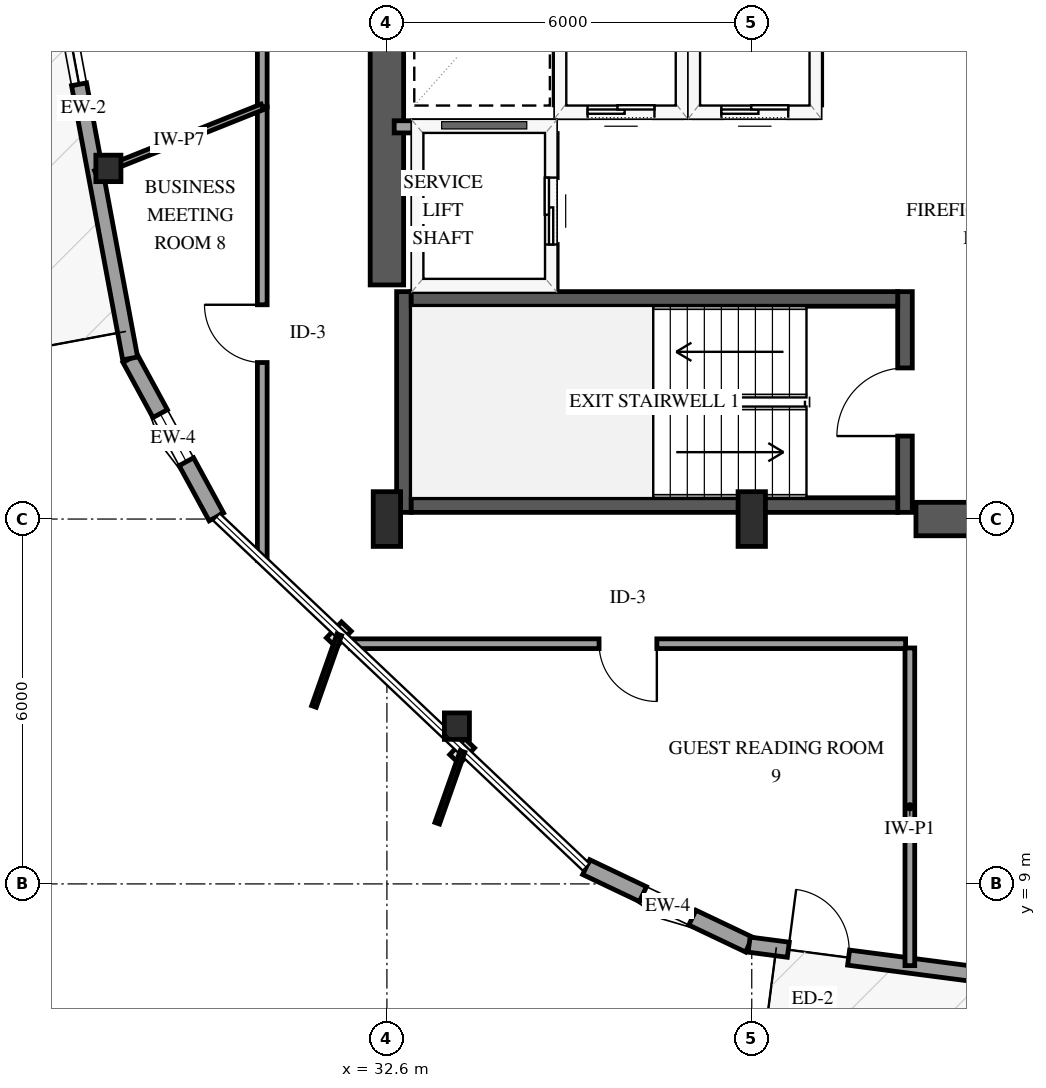
"""IFC4 building model, lengths in metres.
Left out: names, types, materials, properties, quantities, classifications, styles, units other than length and angle.
Written with IfcOpenShell. Run it as: python <this file> out.ifc"""

import sys

from ifc_helpers import new_model, si_unit, direction, frame, frame_2d, origin, origin_2d, place, context, subcontext, project, spatial, rectangle, i_section, extrude, element, fill, save


model = new_model("IFC4")
c1 = context("Model", 3, precision=1e-05, world=origin(), true_north=direction((0.0, 1.0)))
c2 = subcontext(c1, "Body", "Model", "MODEL_VIEW")
j1 = project(units=[si_unit("LENGTHUNIT", "METRE"), si_unit("PLANEANGLEUNIT", "RADIAN")], contexts=[c1])
p1 = place(None, origin())
s1 = spatial("IfcSite", under=j1, at=p1, CompositionType="ELEMENT")
p2 = place(p1, origin())
s2 = spatial("IfcBuilding", under=s1, at=p2, CompositionType="ELEMENT")
p3 = place(p2, frame((0.0, 0.0, 139.0)))
s3 = spatial("IfcBuildingStorey", under=s2, at=p3, CompositionType="ELEMENT", Elevation=139.0)
p4 = place(p3, frame((32.88, 15.11, 0.0), z_axis=(0.0, 0.0, 1.0), x_axis=(0.0, 1.0, 0.0)))
e1 = element("IfcWall", 1, at=p4, inside=s3, PredefinedType="SHEAR", context=c2, shape_type="SweptSolid", body=[
    extrude(rectangle(XDim=3.63, YDim=0.24, at=frame_2d((1.815, 0.0))), origin(), (0.0, 0.0, 1.0), 3.6),
])
p5 = place(p3, frame((41.12, 15.11, 0.0), z_axis=(0.0, 0.0, 1.0), x_axis=(0.0, 1.0, 0.0)))
e2 = element("IfcWall", 2, at=p5, inside=s3, PredefinedType="SHEAR", context=c2, shape_type="SweptSolid", body=[
    extrude(rectangle(XDim=3.63, YDim=0.24, at=frame_2d((1.815, 0.0))), origin(), (0.0, 0.0, 1.0), 3.6),
])
p6 = place(p5, frame((1.255, 0.0, 0.0)))
e3 = element("IfcOpeningElement", 3, at=p6, cuts=e2, PredefinedType="OPENING", context=c2, shape_type="SweptSolid", body=[
    extrude(rectangle(XDim=1.12, YDim=2.15, at=frame_2d((0.56, 1.075))), frame((0.0, 0.13, 0.0), z_axis=(0.0, -1.0, 0.0), x_axis=(1.0, 0.0, 0.0)), (0.0, 0.0, 1.0), 0.26),
])
for number, where, z_axis, x_axis in (
    (4, (33.0, 15.23, 0.0), (0.0, 0.0, 1.0), (1.0, 0.0, 0.0)),
    (5, (33.0, 18.62, 0.0), (0.0, 0.0, 1.0), (1.0, 0.0, 0.0)),
):
    element("IfcWall", number, at=place(p3, frame(where, z_axis=z_axis, x_axis=x_axis)), inside=s3, PredefinedType="SHEAR", context=c2, shape_type="SweptSolid", body=[
        extrude(rectangle(XDim=8.0, YDim=0.24, at=frame_2d((4.0, 0.0))), origin(), (0.0, 0.0, 1.0), 3.6),
    ])
p7 = place(p3, frame((32.6, 18.85, 0.0), z_axis=(0.0, 0.0, 1.0), x_axis=(0.0, 1.0, 0.0)))
e6 = element("IfcWall", 6, at=p7, inside=s3, PredefinedType="SHEAR", context=c2, shape_type="SweptSolid", body=[
    extrude(rectangle(XDim=12.3, YDim=0.55, at=frame_2d((6.15, 0.0))), origin(), (0.0, 0.0, 1.0), 3.6),
])
p8 = place(p3, frame((41.3, 15.0, 0.0), z_axis=(0.0, 0.0, 1.0), x_axis=(1.0, 0.0, 0.0)))
e7 = element("IfcWall", 7, at=p8, inside=s3, PredefinedType="SHEAR", context=c2, shape_type="SweptSolid", body=[
    extrude(rectangle(XDim=2.85, YDim=0.55, at=frame_2d((1.425, 0.0))), origin(), (0.0, 0.0, 1.0), 3.6),
])
for number, where, z_axis, x_axis in (
    (8, (32.6, 15.0, -0.3), (0.0, 0.0, 1.0), (1.0, 0.0, 0.0)),
    (9, (38.6, 15.0, -0.3), (0.0, 0.0, 1.0), (1.0, 0.0, 0.0)),
):
    element("IfcColumn", number, at=place(p3, frame(where, z_axis=z_axis, x_axis=x_axis)), inside=s3, PredefinedType="PILASTER", context=c2, shape_type="SweptSolid", body=[
        extrude(rectangle(XDim=0.45, YDim=0.9, at=origin_2d()), origin(), (0.0, 0.0, 1.0), 3.9),
    ])
for number, where, z_axis, x_axis in (
    (10, (28.02, 20.766, -0.3), (0.0, 0.0, 1.0), (1.0, 0.0, 0.0)),
    (11, (33.751, 11.594, -0.3), (0.0, 0.0, 1.0), (1.0, 0.0, 0.0)),
):
    element("IfcColumn", number, at=place(p3, frame(where, z_axis=z_axis, x_axis=x_axis)), inside=s3, PredefinedType="COLUMN", context=c2, shape_type="SweptSolid", body=[
        extrude(i_section(OverallWidth=0.412, OverallDepth=0.435, WebThickness=0.036, FlangeThickness=0.057, FilletRadius=0.038, at=origin_2d()), origin(), (0.0, 0.0, 1.0), 3.9),
    ])
p9 = place(p3, frame((28.377, 17.641, 0.0), z_axis=(0.0, 0.0, 1.0), x_axis=(0.478085030824, -0.878313556369, 0.0)))
e12 = element("IfcWall", 12, at=p9, inside=s3, PredefinedType="SOLIDWALL", context=c2, shape_type="SweptSolid", body=[
    extrude(rectangle(XDim=2.967, YDim=0.27, at=frame_2d((1.483, 0.0))), origin(), (0.0, 0.0, 1.0), 2.679),
])
p10 = place(p9, frame((1.033, 0.0, 0.75)))
e13 = element("IfcOpeningElement", 13, at=p10, cuts=e12, PredefinedType="OPENING", context=c2, shape_type="SweptSolid", body=[
    extrude(rectangle(XDim=0.9, YDim=1.5, at=frame_2d((0.45, 0.75))), frame((0.0, 0.145, 0.0), z_axis=(0.0, -1.0, 0.0), x_axis=(1.0, 0.0, 0.0)), (0.0, 0.0, 1.0), 0.29),
])
p11 = place(p3, frame((26.842, 25.875, 0.0), z_axis=(0.0, 0.0, 1.0), x_axis=(0.183274789928, -0.983061723076, 0.0)))
e14 = element("IfcWall", 14, at=p11, inside=s3, PredefinedType="SOLIDWALL", context=c2, shape_type="SweptSolid", body=[
    extrude(rectangle(XDim=8.376, YDim=0.25, at=frame_2d((4.188, 0.0))), origin(), (0.0, 0.0, 1.0), 2.679),
])
p12 = place(p11, frame((0.65, 0.0, 0.0)))
e15 = element("IfcOpeningElement", 15, at=p12, cuts=e14, PredefinedType="OPENING", context=c2, shape_type="SweptSolid", body=[
    extrude(rectangle(XDim=1.0, YDim=2.15, at=frame_2d((0.5, 1.075))), frame((0.0, 0.135, 0.0), z_axis=(0.0, -1.0, 0.0), x_axis=(1.0, 0.0, 0.0)), (0.0, 0.0, 1.0), 0.27),
])
p13 = place(p11, frame((2.29, 0.0, 0.72)))
e16 = element("IfcOpeningElement", 16, at=p13, cuts=e14, PredefinedType="OPENING", context=c2, shape_type="SweptSolid", body=[
    extrude(rectangle(XDim=1.5, YDim=1.7, at=frame_2d((0.75, 0.85))), frame((0.0, 0.135, 0.0), z_axis=(0.0, -1.0, 0.0), x_axis=(1.0, 0.0, 0.0)), (0.0, 0.0, 1.0), 0.27),
])
p14 = place(p3, frame((35.878, 9.276, 0.0), z_axis=(0.0, 0.0, 1.0), x_axis=(0.903059702478, -0.429515044859, 0.0)))
e17 = element("IfcWall", 17, at=p14, inside=s3, PredefinedType="SOLIDWALL", context=c2, shape_type="SweptSolid", body=[
    extrude(rectangle(XDim=2.967, YDim=0.27, at=frame_2d((1.483, 0.0))), origin(), (0.0, 0.0, 1.0), 2.679),
])
p15 = place(p14, frame((1.033, 0.0, 0.75)))
e18 = element("IfcOpeningElement", 18, at=p15, cuts=e17, PredefinedType="OPENING", context=c2, shape_type="SweptSolid", body=[
    extrude(rectangle(XDim=0.9, YDim=1.5, at=frame_2d((0.45, 0.75))), frame((0.0, 0.145, 0.0), z_axis=(0.0, -1.0, 0.0), x_axis=(1.0, 0.0, 0.0)), (0.0, 0.0, 1.0), 0.29),
])
p16 = place(p3, frame((38.557, 8.002, 0.0), z_axis=(0.0, 0.0, 1.0), x_axis=(0.991579431853, -0.129499924037, 0.0)))
e19 = element("IfcWall", 19, at=p16, inside=s3, PredefinedType="SOLIDWALL", context=c2, shape_type="SweptSolid", body=[
    extrude(rectangle(XDim=8.376, YDim=0.25, at=frame_2d((4.188, 0.0))), origin(), (0.0, 0.0, 1.0), 2.679),
])
p17 = place(p16, frame((0.65, 0.0, 0.0)))
e20 = element("IfcOpeningElement", 20, at=p17, cuts=e19, PredefinedType="OPENING", context=c2, shape_type="SweptSolid", body=[
    extrude(rectangle(XDim=1.0, YDim=2.15, at=frame_2d((0.5, 1.075))), frame((0.0, 0.135, 0.0), z_axis=(0.0, -1.0, 0.0), x_axis=(1.0, 0.0, 0.0)), (0.0, 0.0, 1.0), 0.27),
])
p18 = place(p16, frame((5.745, 0.0, 0.72)))
e21 = element("IfcOpeningElement", 21, at=p18, cuts=e19, PredefinedType="OPENING", context=c2, shape_type="SweptSolid", body=[
    extrude(rectangle(XDim=1.5, YDim=1.7, at=frame_2d((0.75, 0.85))), frame((0.0, 0.135, 0.0), z_axis=(0.0, -1.0, 0.0), x_axis=(1.0, 0.0, 0.0)), (0.0, 0.0, 1.0), 0.27),
])
p19 = place(p3, frame((35.45, 21.7, 0.0), z_axis=(0.0, 0.0, 1.0), x_axis=(1.0, 0.0, 0.0)))
e22 = element("IfcWall", 22, at=p19, inside=s3, PredefinedType="SOLIDWALL", context=c2, shape_type="SweptSolid", body=[
    extrude(rectangle(XDim=2.0, YDim=0.2, at=frame_2d((1.0, 0.0))), origin(), (0.0, 0.0, 1.0), 3.3),
])
p20 = place(p19, frame((0.45, 0.0, 0.0)))
e23 = element("IfcOpeningElement", 23, at=p20, cuts=e22, PredefinedType="OPENING", context=c2, shape_type="SweptSolid", body=[
    extrude(rectangle(XDim=1.1, YDim=2.15, at=frame_2d((0.55, 1.075))), frame((0.0, 0.11, 0.0), z_axis=(0.0, -1.0, 0.0), x_axis=(1.0, 0.0, 0.0)), (0.0, 0.0, 1.0), 0.22),
])
for number, where, z_axis, x_axis in (
    (24, (35.45, 21.81, 0.0), (0.0, 0.0, 1.0), (0.0, 1.0, 0.0)),
    (25, (37.45, 21.81, 0.0), (0.0, 0.0, 1.0), (0.0, 1.0, 0.0)),
):
    element("IfcWall", number, at=place(p3, frame(where, z_axis=z_axis, x_axis=x_axis)), inside=s3, PredefinedType="SOLIDWALL", context=c2, shape_type="SweptSolid", body=[
        extrude(rectangle(XDim=2.38, YDim=0.2, at=frame_2d((1.19, 0.0))), origin(), (0.0, 0.0, 1.0), 3.3),
    ])
p21 = place(p3, frame((37.65, 21.7, 0.0), z_axis=(0.0, 0.0, 1.0), x_axis=(1.0, 0.0, 0.0)))
e26 = element("IfcWall", 26, at=p21, inside=s3, PredefinedType="SOLIDWALL", context=c2, shape_type="SweptSolid", body=[
    extrude(rectangle(XDim=2.0, YDim=0.2, at=frame_2d((1.0, 0.0))), origin(), (0.0, 0.0, 1.0), 3.3),
])
p22 = place(p21, frame((0.45, 0.0, 0.0)))
e27 = element("IfcOpeningElement", 27, at=p22, cuts=e26, PredefinedType="OPENING", context=c2, shape_type="SweptSolid", body=[
    extrude(rectangle(XDim=1.1, YDim=2.15, at=frame_2d((0.55, 1.075))), frame((0.0, 0.11, 0.0), z_axis=(0.0, -1.0, 0.0), x_axis=(1.0, 0.0, 0.0)), (0.0, 0.0, 1.0), 0.22),
])
p23 = place(p3, frame((39.65, 21.81, 0.0), z_axis=(0.0, 0.0, 1.0), x_axis=(0.0, 1.0, 0.0)))
e28 = element("IfcWall", 28, at=p23, inside=s3, PredefinedType="SOLIDWALL", context=c2, shape_type="SweptSolid", body=[
    extrude(rectangle(XDim=2.38, YDim=0.2, at=frame_2d((1.19, 0.0))), origin(), (0.0, 0.0, 1.0), 3.3),
])
p24 = place(p3, frame((32.72, 21.45, 0.0), z_axis=(0.0, 0.0, 1.0), x_axis=(1.0, 0.0, 0.0)))
e29 = element("IfcWall", 29, at=p24, inside=s3, PredefinedType="SOLIDWALL", context=c2, shape_type="SweptSolid", body=[
    extrude(rectangle(XDim=2.58, YDim=0.2, at=frame_2d((1.29, 0.0))), origin(), (0.0, 0.0, 1.0), 3.3),
])
p25 = place(p3, frame((35.3, 18.79, 0.0), z_axis=(0.0, 0.0, 1.0), x_axis=(0.0, 1.0, 0.0)))
e30 = element("IfcWall", 30, at=p25, inside=s3, PredefinedType="SOLIDWALL", context=c2, shape_type="SweptSolid", body=[
    extrude(rectangle(XDim=2.55, YDim=0.2, at=frame_2d((1.275, 0.0))), origin(), (0.0, 0.0, 1.0), 3.3),
])
p26 = place(p25, frame((0.725, 0.0, 0.0)))
e31 = element("IfcOpeningElement", 31, at=p26, cuts=e30, PredefinedType="OPENING", context=c2, shape_type="SweptSolid", body=[
    extrude(rectangle(XDim=1.1, YDim=2.15, at=frame_2d((0.55, 1.075))), frame((0.0, 0.11, 0.0), z_axis=(0.0, -1.0, 0.0), x_axis=(1.0, 0.0, 0.0)), (0.0, 0.0, 1.0), 0.22),
])
p27 = place(p3, frame((30.55, 21.778, 0.0), z_axis=(0.0, 0.0, 1.0), x_axis=(0.0, 1.0, 0.0)))
e32 = element("IfcWall", 32, at=p27, inside=s3, PredefinedType="PARTITIONING", context=c2, shape_type="SweptSolid", body=[
    extrude(rectangle(XDim=14.025, YDim=0.16, at=frame_2d((7.012, 0.0))), origin(), (0.0, 0.0, 1.0), 3.3),
])
p28 = place(p27, frame((6.537, 0.0, 0.0)))
e33 = element("IfcOpeningElement", 33, at=p28, cuts=e32, PredefinedType="OPENING", context=c2, shape_type="SweptSolid", body=[
    extrude(rectangle(XDim=0.95, YDim=2.15, at=frame_2d((0.475, 1.075))), frame((0.0, 0.09, 0.0), z_axis=(0.0, -1.0, 0.0), x_axis=(1.0, 0.0, 0.0)), (0.0, 0.0, 1.0), 0.18),
])
p29 = place(p3, frame((41.13, 12.95, 0.0), z_axis=(0.0, 0.0, 1.0), x_axis=(-1.0, 0.0, 0.0)))
e34 = element("IfcWall", 34, at=p29, inside=s3, PredefinedType="PARTITIONING", context=c2, shape_type="SweptSolid", body=[
    extrude(rectangle(XDim=9.132, YDim=0.16, at=frame_2d((4.566, 0.0))), origin(), (0.0, 0.0, 1.0), 3.3),
])
p30 = place(p29, frame((4.091, 0.0, 0.0)))
e35 = element("IfcOpeningElement", 35, at=p30, cuts=e34, PredefinedType="OPENING", context=c2, shape_type="SweptSolid", body=[
    extrude(rectangle(XDim=0.95, YDim=2.15, at=frame_2d((0.475, 1.075))), frame((0.0, 0.09, 0.0), z_axis=(0.0, -1.0, 0.0), x_axis=(1.0, 0.0, 0.0)), (0.0, 0.0, 1.0), 0.18),
])
p31 = place(p3, frame((30.55, 14.321, 0.0), z_axis=(0.0, 0.0, 1.0), x_axis=(0.0, 1.0, 0.0)))
e36 = element("IfcWall", 36, at=p31, inside=s3, PredefinedType="PARTITIONING", context=c2, shape_type="SweptSolid", body=[
    extrude(rectangle(XDim=7.457, YDim=0.16, at=frame_2d((3.729, 0.0))), origin(), (0.0, 0.0, 1.0), 3.3),
])
p32 = place(p31, frame((3.253, 0.0, 0.0)))
e37 = element("IfcOpeningElement", 37, at=p32, cuts=e36, PredefinedType="OPENING", context=c2, shape_type="SweptSolid", body=[
    extrude(rectangle(XDim=0.95, YDim=2.15, at=frame_2d((0.475, 1.075))), frame((0.0, 0.09, 0.0), z_axis=(0.0, -1.0, 0.0), x_axis=(1.0, 0.0, 0.0)), (0.0, 0.0, 1.0), 0.18),
])
p33 = place(p3, frame((41.2, 7.656, 0.0), z_axis=(0.0, 0.0, 1.0), x_axis=(0.0, 1.0, 0.0)))
e38 = element("IfcWall", 38, at=p33, inside=s3, PredefinedType="PARTITIONING", context=c2, shape_type="SweptSolid", body=[
    extrude(rectangle(XDim=5.224, YDim=0.16, at=frame_2d((2.612, 0.0))), origin(), (0.0, 0.0, 1.0), 2.674),
])
p34 = place(p3, frame((30.55, 21.778, 0.0), z_axis=(0.0, 0.0, 1.0), x_axis=(-0.928596473604, -0.371091079401, 0.0)))
e39 = element("IfcWall", 39, at=p34, inside=s3, PredefinedType="PARTITIONING", context=c2, shape_type="SweptSolid", body=[
    extrude(rectangle(XDim=2.951, YDim=0.1, at=frame_2d((1.475, 0.0))), origin(), (0.0, 0.0, 1.0), 3.3),
])
p35 = place(p10, origin())
e40 = element("IfcWindow", 40, at=p35, inside=s3, PartitioningType="SINGLE_PANEL", PredefinedType="WINDOW", context=c2, shape_type="SweptSolid", body=[
    extrude(rectangle(XDim=0.9, YDim=1.5, at=frame_2d((0.45, 0.75))), frame((0.0, 0.03, 0.0), z_axis=(0.0, -1.0, 0.0), x_axis=(1.0, 0.0, 0.0)), (0.0, 0.0, 1.0), 0.06),
])
fill(e13, e40)
p36 = place(p13, origin())
e41 = element("IfcWindow", 41, at=p36, inside=s3, PartitioningType="SINGLE_PANEL", PredefinedType="WINDOW", context=c2, shape_type="SweptSolid", body=[
    extrude(rectangle(XDim=1.5, YDim=1.7, at=frame_2d((0.75, 0.85))), frame((0.0, 0.03, 0.0), z_axis=(0.0, -1.0, 0.0), x_axis=(1.0, 0.0, 0.0)), (0.0, 0.0, 1.0), 0.06),
])
fill(e16, e41)
p37 = place(p15, origin())
e42 = element("IfcWindow", 42, at=p37, inside=s3, PartitioningType="SINGLE_PANEL", PredefinedType="WINDOW", context=c2, shape_type="SweptSolid", body=[
    extrude(rectangle(XDim=0.9, YDim=1.5, at=frame_2d((0.45, 0.75))), frame((0.0, 0.03, 0.0), z_axis=(0.0, -1.0, 0.0), x_axis=(1.0, 0.0, 0.0)), (0.0, 0.0, 1.0), 0.06),
])
fill(e18, e42)
p38 = place(p17, origin())
e43 = element("IfcDoor", 43, at=p38, inside=s3, OperationType="SINGLE_SWING_LEFT", PredefinedType="DOOR", context=c2, shape_type="SweptSolid", body=[
    extrude(rectangle(XDim=1.0, YDim=2.15, at=frame_2d((0.5, 1.075))), frame((0.0, 0.025, 0.0), z_axis=(0.0, -1.0, 0.0), x_axis=(1.0, 0.0, 0.0)), (0.0, 0.0, 1.0), 0.05),
])
fill(e20, e43)
p39 = place(p20, origin())
e44 = element("IfcDoor", 44, at=p39, inside=s3, OperationType="SLIDING_TO_LEFT", PredefinedType="DOOR", context=c2, shape_type="SweptSolid", body=[
    extrude(rectangle(XDim=1.1, YDim=2.15, at=frame_2d((0.55, 1.075))), frame((0.0, 0.025, 0.0), z_axis=(0.0, -1.0, 0.0), x_axis=(1.0, 0.0, 0.0)), (0.0, 0.0, 1.0), 0.05),
])
fill(e23, e44)
p40 = place(p22, origin())
e45 = element("IfcDoor", 45, at=p40, inside=s3, OperationType="SLIDING_TO_LEFT", PredefinedType="DOOR", context=c2, shape_type="SweptSolid", body=[
    extrude(rectangle(XDim=1.1, YDim=2.15, at=frame_2d((0.55, 1.075))), frame((0.0, 0.025, 0.0), z_axis=(0.0, -1.0, 0.0), x_axis=(1.0, 0.0, 0.0)), (0.0, 0.0, 1.0), 0.05),
])
fill(e27, e45)
p41 = place(p26, origin())
e46 = element("IfcDoor", 46, at=p41, inside=s3, OperationType="SLIDING_TO_LEFT", PredefinedType="DOOR", context=c2, shape_type="SweptSolid", body=[
    extrude(rectangle(XDim=1.1, YDim=2.15, at=frame_2d((0.55, 1.075))), frame((0.0, 0.025, 0.0), z_axis=(0.0, -1.0, 0.0), x_axis=(1.0, 0.0, 0.0)), (0.0, 0.0, 1.0), 0.05),
])
fill(e31, e46)
p42 = place(p6, origin())
e47 = element("IfcDoor", 47, at=p42, inside=s3, OperationType="SINGLE_SWING_LEFT", PredefinedType="DOOR", context=c2, shape_type="SweptSolid", body=[
    extrude(rectangle(XDim=1.12, YDim=2.15, at=frame_2d((0.56, 1.075))), frame((0.0, 0.025, 0.0), z_axis=(0.0, -1.0, 0.0), x_axis=(1.0, 0.0, 0.0)), (0.0, 0.0, 1.0), 0.05),
])
fill(e3, e47)
p43 = place(p30, origin())
e48 = element("IfcDoor", 48, at=p43, inside=s3, OperationType="SINGLE_SWING_LEFT", PredefinedType="DOOR", context=c2, shape_type="SweptSolid", body=[
    extrude(rectangle(XDim=0.95, YDim=2.15, at=frame_2d((0.475, 1.075))), frame((0.0, 0.025, 0.0), z_axis=(0.0, -1.0, 0.0), x_axis=(1.0, 0.0, 0.0)), (0.0, 0.0, 1.0), 0.05),
])
fill(e35, e48)
p44 = place(p32, origin())
e49 = element("IfcDoor", 49, at=p44, inside=s3, OperationType="SINGLE_SWING_RIGHT", PredefinedType="DOOR", context=c2, shape_type="SweptSolid", body=[
    extrude(rectangle(XDim=0.95, YDim=2.15, at=frame_2d((0.475, 1.075))), frame((0.0, 0.025, 0.0), z_axis=(0.0, -1.0, 0.0), x_axis=(1.0, 0.0, 0.0)), (0.0, 0.0, 1.0), 0.05),
])
fill(e37, e49)
save(model, sys.argv[1])
